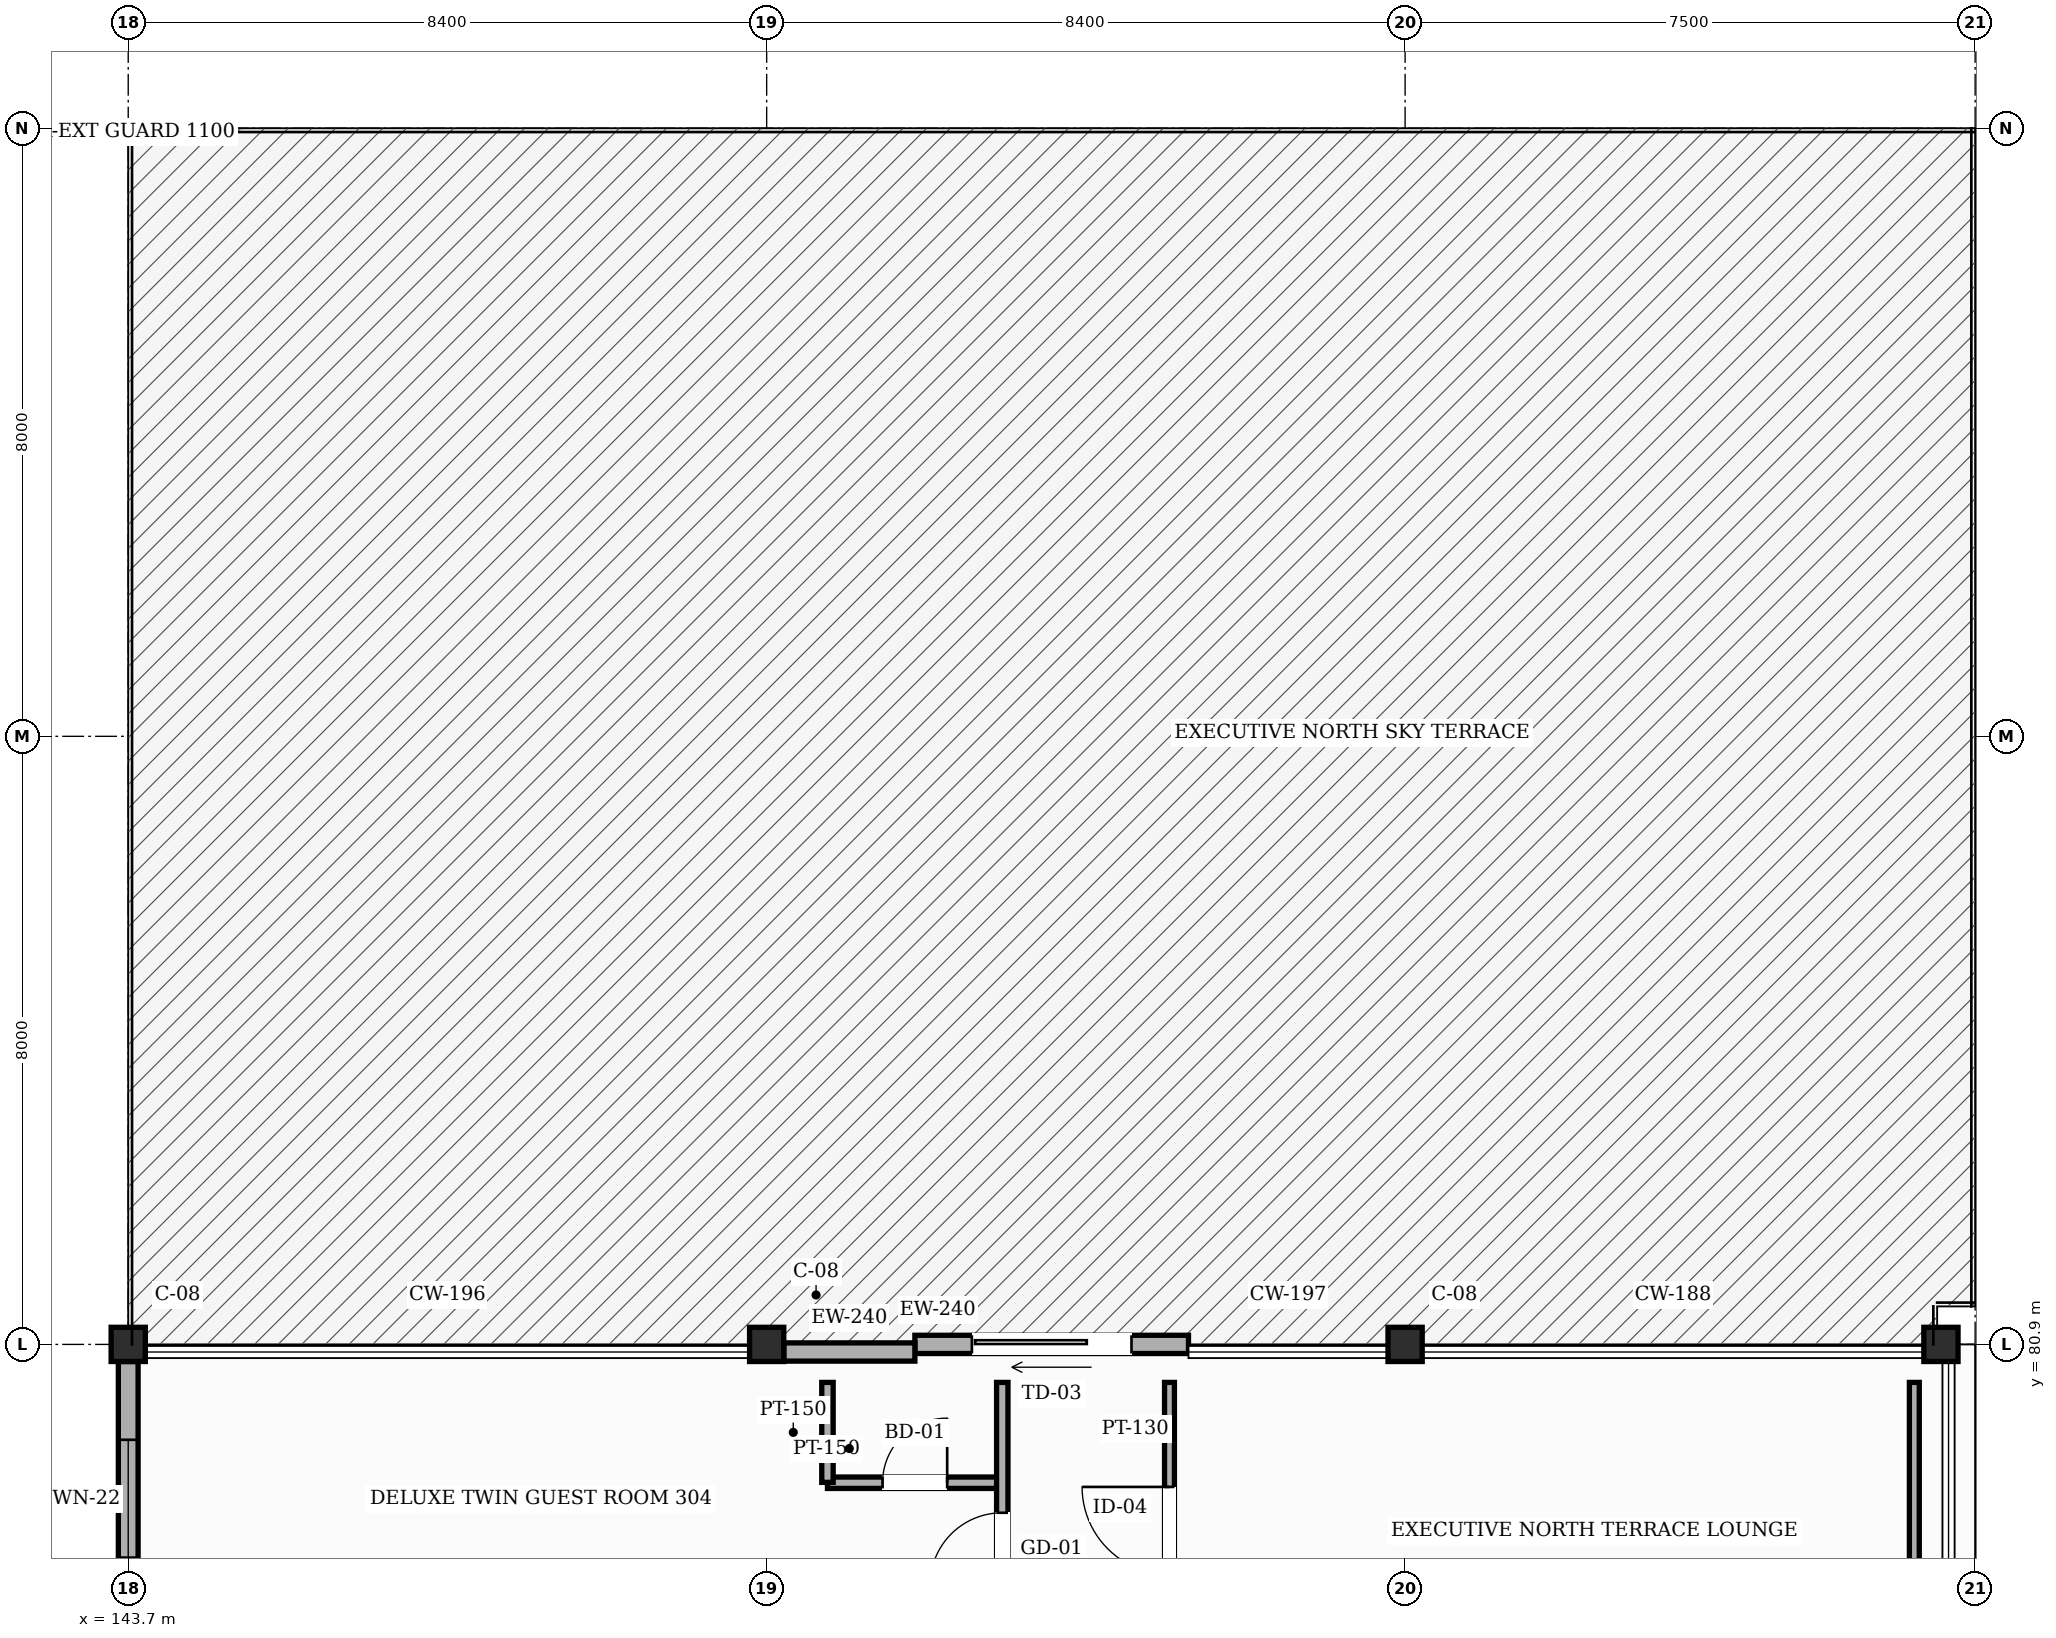
"""IFC4 building model, lengths in metres.
Left out: names, types, materials, properties, quantities, classifications, styles, units other than length and angle.
Written with IfcOpenShell. Run it as: python <this file> out.ifc"""

import sys

from ifc_helpers import new_model, si_unit, direction, frame, frame_2d, origin, origin_2d, place, context, subcontext, project, spatial, rectangle, hollow_rectangle, extrude, element, fill, save


model = new_model("IFC4")
c1 = context("Model", 3, precision=1e-05, world=origin(), true_north=direction((0.0, 1.0)))
c2 = subcontext(c1, "Body", "Model", "MODEL_VIEW")
j1 = project(units=[si_unit("LENGTHUNIT", "METRE"), si_unit("PLANEANGLEUNIT", "RADIAN")], contexts=[c1])
p1 = place(None, origin())
s1 = spatial("IfcSite", under=j1, at=p1, CompositionType="ELEMENT")
p2 = place(p1, origin())
s2 = spatial("IfcBuilding", under=s1, at=p2, CompositionType="ELEMENT")
p3 = place(p2, frame((0.0, 0.0, 42.6)))
s3 = spatial("IfcBuildingStorey", under=s2, at=p3, CompositionType="ELEMENT", Elevation=42.6)
for number, where, z_axis, x_axis in (
    (1, (143.7, 80.9, 0.0), (0.0, 0.0, 1.0), (1.0, 0.0, 0.0)),
    (2, (152.1, 80.9, 0.0), (0.0, 0.0, 1.0), (1.0, 0.0, 0.0)),
    (3, (160.5, 80.9, 0.0), (0.0, 0.0, 1.0), (1.0, 0.0, 0.0)),
    (4, (167.55, 80.9, 0.0), (0.0, 0.0, 1.0), (1.0, 0.0, 0.0)),
):
    element("IfcColumn", number, at=place(p3, frame(where, z_axis=z_axis, x_axis=x_axis)), inside=s3, PredefinedType="COLUMN", context=c2, shape_type="SweptSolid", body=[
        extrude(hollow_rectangle(XDim=0.45, YDim=0.45, WallThickness=0.019, InnerFilletRadius=0.019, OuterFilletRadius=0.038, at=origin_2d()), origin(), (0.0, 0.0, 1.0), 3.6),
    ])
p4 = place(p3, frame((143.7, 73.575, 0.0), z_axis=(0.0, 0.0, 1.0), x_axis=(0.0, 1.0, 0.0)))
e5 = element("IfcWall", 5, at=p4, inside=s3, PredefinedType="SOLIDWALL", context=c2, shape_type="SweptSolid", body=[
    extrude(rectangle(XDim=7.1, YDim=0.26, at=frame_2d((3.55, 0.0))), origin(), (0.0, 0.0, 1.0), 2.805),
])
p5 = place(p4, frame((1.55, 0.0, 0.85)))
e6 = element("IfcOpeningElement", 6, at=p5, cuts=e5, PredefinedType="OPENING", context=c2, shape_type="SweptSolid", body=[
    extrude(rectangle(XDim=1.35, YDim=1.5, at=frame_2d((0.675, 0.75))), frame((0.0, 0.14, 0.0), z_axis=(0.0, -1.0, 0.0), x_axis=(1.0, 0.0, 0.0)), (0.0, 0.0, 1.0), 0.28),
])
p6 = place(p4, frame((4.52, 0.0, 0.85)))
e7 = element("IfcOpeningElement", 7, at=p6, cuts=e5, PredefinedType="OPENING", context=c2, shape_type="SweptSolid", body=[
    extrude(rectangle(XDim=1.55, YDim=1.5, at=frame_2d((0.775, 0.75))), frame((0.0, 0.14, 0.0), z_axis=(0.0, -1.0, 0.0), x_axis=(1.0, 0.0, 0.0)), (0.0, 0.0, 1.0), 0.28),
])
p7 = place(p3, frame((154.05, 80.9, 0.0), z_axis=(0.0, 0.0, 1.0), x_axis=(1.0, 0.0, 0.0)))
e8 = element("IfcWall", 8, at=p7, inside=s3, PredefinedType="SOLIDWALL", context=c2, shape_type="SweptSolid", body=[
    extrude(rectangle(XDim=3.6, YDim=0.24, at=frame_2d((1.8, 0.0))), origin(), (0.0, 0.0, 1.0), 2.755),
])
p8 = place(p7, frame((0.75, 0.0, 0.0)))
e9 = element("IfcOpeningElement", 9, at=p8, cuts=e8, PredefinedType="OPENING", context=c2, shape_type="SweptSolid", body=[
    extrude(rectangle(XDim=2.1, YDim=2.4, at=frame_2d((1.05, 1.2))), frame((0.0, 0.13, 0.0), z_axis=(0.0, -1.0, 0.0), x_axis=(1.0, 0.0, 0.0)), (0.0, 0.0, 1.0), 0.26),
])
p9 = place(p3, frame((152.325, 80.8, 0.0), z_axis=(0.0, 0.0, 1.0), x_axis=(1.0, 0.0, 0.0)))
e10 = element("IfcWall", 10, at=p9, inside=s3, PredefinedType="SOLIDWALL", context=c2, shape_type="SweptSolid", body=[
    extrude(rectangle(XDim=1.725, YDim=0.24, at=frame_2d((0.863, 0.0))), origin(), (0.0, 0.0, 1.0), 2.755),
])
p10 = place(p3, frame((152.9, 79.08, 0.0), z_axis=(0.0, 0.0, 1.0), x_axis=(1.0, 0.0, 0.0)))
e11 = element("IfcWall", 11, at=p10, inside=s3, PredefinedType="PARTITIONING", context=c2, shape_type="SweptSolid", body=[
    extrude(rectangle(XDim=2.3, YDim=0.15, at=frame_2d((1.15, 0.0))), origin(), (0.0, 0.0, 1.0), 3.365),
])
p11 = place(p10, frame((0.725, 0.0, 0.0)))
e12 = element("IfcOpeningElement", 12, at=p11, cuts=e11, PredefinedType="OPENING", context=c2, shape_type="SweptSolid", body=[
    extrude(rectangle(XDim=0.85, YDim=2.1, at=frame_2d((0.425, 1.05))), frame((0.0, 0.085, 0.0), z_axis=(0.0, -1.0, 0.0), x_axis=(1.0, 0.0, 0.0)), (0.0, 0.0, 1.0), 0.17),
])
p12 = place(p3, frame((152.9, 79.085, 0.0), z_axis=(0.0, 0.0, 1.0), x_axis=(0.0, 1.0, 0.0)))
e13 = element("IfcWall", 13, at=p12, inside=s3, PredefinedType="PARTITIONING", context=c2, shape_type="SweptSolid", body=[
    extrude(rectangle(XDim=1.315, YDim=0.15, at=frame_2d((0.657, 0.0))), origin(), (0.0, 0.0, 1.0), 3.365),
])
p13 = place(p3, frame((155.2, 62.0, 0.0), z_axis=(0.0, 0.0, 1.0), x_axis=(0.0, 1.0, 0.0)))
e14 = element("IfcWall", 14, at=p13, inside=s3, PredefinedType="PARTITIONING", context=c2, shape_type="SweptSolid", body=[
    extrude(rectangle(XDim=18.4, YDim=0.15, at=frame_2d((9.2, 0.0))), origin(), (0.0, 0.0, 1.0), 3.365),
])
p14 = place(p13, frame((0.325, 0.0, 0.0)))
e15 = element("IfcOpeningElement", 15, at=p14, cuts=e14, PredefinedType="OPENING", context=c2, shape_type="SweptSolid", body=[
    extrude(rectangle(XDim=1.1, YDim=2.2, at=frame_2d((0.55, 1.1))), frame((0.0, 0.085, 0.0), z_axis=(0.0, -1.0, 0.0), x_axis=(1.0, 0.0, 0.0)), (0.0, 0.0, 1.0), 0.17),
])
p15 = place(p13, frame((3.465, 0.0, 0.0)))
e16 = element("IfcOpeningElement", 16, at=p15, cuts=e14, PredefinedType="OPENING", context=c2, shape_type="SweptSolid", body=[
    extrude(rectangle(XDim=0.95, YDim=2.15, at=frame_2d((0.475, 1.075))), frame((0.0, 0.085, 0.0), z_axis=(0.0, -1.0, 0.0), x_axis=(1.0, 0.0, 0.0)), (0.0, 0.0, 1.0), 0.17),
])
p16 = place(p13, frame((6.535, 0.0, 0.0)))
e17 = element("IfcOpeningElement", 17, at=p16, cuts=e14, PredefinedType="OPENING", context=c2, shape_type="SweptSolid", body=[
    extrude(rectangle(XDim=0.95, YDim=2.15, at=frame_2d((0.475, 1.075))), frame((0.0, 0.085, 0.0), z_axis=(0.0, -1.0, 0.0), x_axis=(1.0, 0.0, 0.0)), (0.0, 0.0, 1.0), 0.17),
])
p17 = place(p13, frame((9.6, 0.0, 0.0)))
e18 = element("IfcOpeningElement", 18, at=p17, cuts=e14, PredefinedType="OPENING", context=c2, shape_type="SweptSolid", body=[
    extrude(rectangle(XDim=0.95, YDim=2.15, at=frame_2d((0.475, 1.075))), frame((0.0, 0.085, 0.0), z_axis=(0.0, -1.0, 0.0), x_axis=(1.0, 0.0, 0.0)), (0.0, 0.0, 1.0), 0.17),
])
p18 = place(p13, frame((12.665, 0.0, 0.0)))
e19 = element("IfcOpeningElement", 19, at=p18, cuts=e14, PredefinedType="OPENING", context=c2, shape_type="SweptSolid", body=[
    extrude(rectangle(XDim=0.95, YDim=2.15, at=frame_2d((0.475, 1.075))), frame((0.0, 0.085, 0.0), z_axis=(0.0, -1.0, 0.0), x_axis=(1.0, 0.0, 0.0)), (0.0, 0.0, 1.0), 0.17),
])
p19 = place(p13, frame((15.735, 0.0, 0.0)))
e20 = element("IfcOpeningElement", 20, at=p19, cuts=e14, PredefinedType="OPENING", context=c2, shape_type="SweptSolid", body=[
    extrude(rectangle(XDim=0.95, YDim=2.15, at=frame_2d((0.475, 1.075))), frame((0.0, 0.085, 0.0), z_axis=(0.0, -1.0, 0.0), x_axis=(1.0, 0.0, 0.0)), (0.0, 0.0, 1.0), 0.17),
])
p20 = place(p3, frame((157.4, 76.5, 0.0), z_axis=(0.0, 0.0, 1.0), x_axis=(0.0, 1.0, 0.0)))
e21 = element("IfcWall", 21, at=p20, inside=s3, PredefinedType="PARTITIONING", context=c2, shape_type="SweptSolid", body=[
    extrude(rectangle(XDim=3.9, YDim=0.13, at=frame_2d((1.95, 0.0))), origin(), (0.0, 0.0, 1.0), 3.365),
])
p21 = place(p20, frame((1.375, 0.0, 0.0)))
e22 = element("IfcOpeningElement", 22, at=p21, cuts=e21, PredefinedType="OPENING", context=c2, shape_type="SweptSolid", body=[
    extrude(rectangle(XDim=1.15, YDim=2.22, at=frame_2d((0.575, 1.11))), frame((0.0, 0.075, 0.0), z_axis=(0.0, -1.0, 0.0), x_axis=(1.0, 0.0, 0.0)), (0.0, 0.0, 1.0), 0.15),
])
p22 = place(p3, frame((167.2, 76.5, 0.0), z_axis=(0.0, 0.0, 1.0), x_axis=(0.0, 1.0, 0.0)))
e23 = element("IfcWall", 23, at=p22, inside=s3, PredefinedType="PARTITIONING", context=c2, shape_type="SweptSolid", body=[
    extrude(rectangle(XDim=3.9, YDim=0.13, at=frame_2d((1.95, 0.0))), origin(), (0.0, 0.0, 1.0), 3.365),
])
p23 = place(p6, origin())
e24 = element("IfcWindow", 24, at=p23, inside=s3, PartitioningType="SINGLE_PANEL", PredefinedType="WINDOW", context=c2, shape_type="SweptSolid", body=[
    extrude(rectangle(XDim=1.55, YDim=1.5, at=frame_2d((0.775, 0.75))), frame((0.0, 0.03, 0.0), z_axis=(0.0, -1.0, 0.0), x_axis=(1.0, 0.0, 0.0)), (0.0, 0.0, 1.0), 0.06),
])
fill(e7, e24)
p24 = place(p8, origin())
e25 = element("IfcDoor", 25, at=p24, inside=s3, OperationType="SLIDING_TO_LEFT", PredefinedType="DOOR", context=c2, shape_type="SweptSolid", body=[
    extrude(rectangle(XDim=2.1, YDim=2.4, at=frame_2d((1.05, 1.2))), frame((0.0, 0.025, 0.0), z_axis=(0.0, -1.0, 0.0), x_axis=(1.0, 0.0, 0.0)), (0.0, 0.0, 1.0), 0.05),
])
fill(e9, e25)
p25 = place(p21, origin())
e26 = element("IfcDoor", 26, at=p25, inside=s3, OperationType="SINGLE_SWING_RIGHT", PredefinedType="DOOR", context=c2, shape_type="SweptSolid", body=[
    extrude(rectangle(XDim=1.15, YDim=2.22, at=frame_2d((0.575, 1.11))), frame((0.0, 0.025, 0.0), z_axis=(0.0, -1.0, 0.0), x_axis=(1.0, 0.0, 0.0)), (0.0, 0.0, 1.0), 0.05),
])
fill(e22, e26)
p26 = place(p19, origin())
e27 = element("IfcDoor", 27, at=p26, inside=s3, OperationType="SINGLE_SWING_LEFT", PredefinedType="DOOR", context=c2, shape_type="SweptSolid", body=[
    extrude(rectangle(XDim=0.95, YDim=2.15, at=frame_2d((0.475, 1.075))), frame((0.0, 0.025, 0.0), z_axis=(0.0, -1.0, 0.0), x_axis=(1.0, 0.0, 0.0)), (0.0, 0.0, 1.0), 0.05),
])
fill(e20, e27)
p27 = place(p11, origin())
e28 = element("IfcDoor", 28, at=p27, inside=s3, OperationType="SINGLE_SWING_RIGHT", PredefinedType="DOOR", context=c2, shape_type="SweptSolid", body=[
    extrude(rectangle(XDim=0.85, YDim=2.1, at=frame_2d((0.425, 1.05))), frame((0.0, 0.025, 0.0), z_axis=(0.0, -1.0, 0.0), x_axis=(1.0, 0.0, 0.0)), (0.0, 0.0, 1.0), 0.05),
])
fill(e12, e28)
save(model, sys.argv[1])
